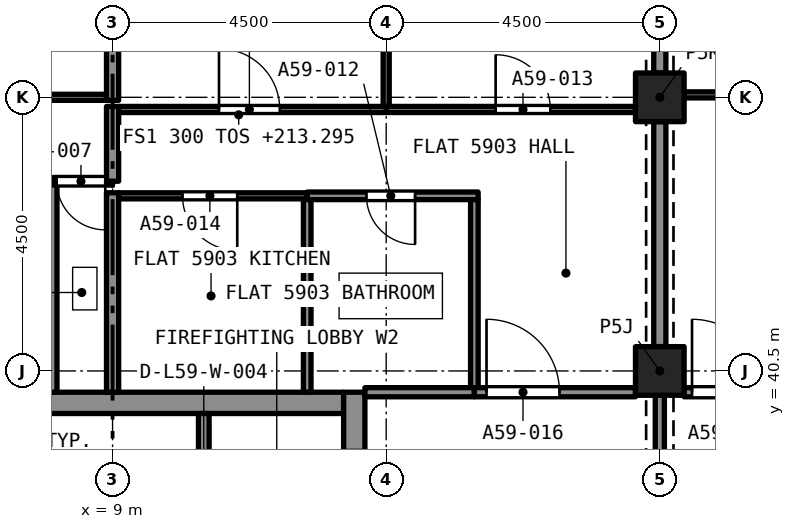
"""IFC4 building model, lengths in metres.
Left out: names, types, materials, properties, quantities, classifications, styles, units other than length and angle.
Written with IfcOpenShell. Run it as: python <this file> out.ifc"""

import sys

from ifc_helpers import new_model, si_unit, direction, frame, frame_2d, origin, origin_2d, place, context, subcontext, project, spatial, rectangle, extrude, element, fill, save


model = new_model("IFC4")
c1 = context("Model", 3, precision=1e-05, world=origin(), true_north=direction((0.0, 1.0)))
c2 = subcontext(c1, "Body", "Model", "MODEL_VIEW")
j1 = project(units=[si_unit("LENGTHUNIT", "METRE"), si_unit("PLANEANGLEUNIT", "RADIAN")], contexts=[c1])
p1 = place(None, origin())
s1 = spatial("IfcSite", under=j1, at=p1, CompositionType="ELEMENT")
p2 = place(p1, origin())
s2 = spatial("IfcBuilding", under=s1, at=p2, CompositionType="ELEMENT")
p3 = place(p2, frame((0.0, 0.0, 213.295)))
s3 = spatial("IfcBuildingStorey", under=s2, at=p3, CompositionType="ELEMENT", Elevation=213.295)
for number, where, z_axis, x_axis in (
    (1, (18.0, 40.5, 0.0), (0.0, 0.0, 1.0), (1.0, 0.0, 0.0)),
    (2, (18.0, 45.0, 0.0), (0.0, 0.0, 1.0), (1.0, 0.0, 0.0)),
):
    element("IfcColumn", number, at=place(p3, frame(where, z_axis=z_axis, x_axis=x_axis)), inside=s3, PredefinedType="COLUMN", context=c2, shape_type="SweptSolid", body=[
        extrude(rectangle(XDim=0.8, YDim=0.8, at=origin_2d()), origin(), (0.0, 0.0, 1.0), 3.2),
    ])
p4 = place(p3, frame((5.2, 39.975, 0.0), z_axis=(0.0, 0.0, 1.0), x_axis=(1.0, 0.0, 0.0)))
e3 = element("IfcWall", 3, at=p4, inside=s3, PredefinedType="SOLIDWALL", context=c2, shape_type="SweptSolid", body=[
    extrude(rectangle(XDim=7.6, YDim=0.35, at=frame_2d((3.8, 0.0))), origin(), (0.0, 0.0, 1.0), 3.2),
])
p5 = place(p3, frame((12.975, 27.35, 0.0), z_axis=(0.0, 0.0, 1.0), x_axis=(0.0, 1.0, 0.0)))
e4 = element("IfcWall", 4, at=p5, inside=s3, PredefinedType="SOLIDWALL", context=c2, shape_type="SweptSolid", body=[
    extrude(rectangle(XDim=12.8, YDim=0.35, at=frame_2d((6.4, 0.0))), origin(), (0.0, 0.0, 1.0), 3.2),
])
p6 = place(p5, frame((10.75, 0.0, 0.0)))
e5 = element("IfcOpeningElement", 5, at=p6, cuts=e4, PredefinedType="OPENING", context=c2, shape_type="SweptSolid", body=[
    extrude(rectangle(XDim=1.1, YDim=2.1, at=frame_2d((0.55, 1.05))), frame((0.0, 0.185, 0.0), z_axis=(0.0, -1.0, 0.0), x_axis=(1.0, 0.0, 0.0)), (0.0, 0.0, 1.0), 0.37),
])
p7 = place(p5, frame((8.6, 0.0, 0.0)))
e6 = element("IfcOpeningElement", 6, at=p7, cuts=e4, PredefinedType="OPENING", context=c2, shape_type="SweptSolid", body=[
    extrude(rectangle(XDim=1.2, YDim=2.1, at=frame_2d((0.6, 1.05))), frame((0.0, 0.185, 0.0), z_axis=(0.0, -1.0, 0.0), x_axis=(1.0, 0.0, 0.0)), (0.0, 0.0, 1.0), 0.37),
])
p8 = place(p3, frame((9.0, 43.62, 0.0), z_axis=(0.0, 0.0, 1.0), x_axis=(-1.0, 0.0, 0.0)))
e7 = element("IfcWall", 7, at=p8, inside=s3, PredefinedType="PARTITIONING", context=c2, shape_type="SweptSolid", body=[
    extrude(rectangle(XDim=0.977, YDim=0.125, at=frame_2d((0.489, 0.0))), origin(), (0.0, 0.0, 1.0), 2.9),
])
p9 = place(p8, frame((0.12, 0.0, 0.0)))
e8 = element("IfcOpeningElement", 8, at=p9, cuts=e7, PredefinedType="OPENING", context=c2, shape_type="SweptSolid", body=[
    extrude(rectangle(XDim=0.8, YDim=2.1, at=frame_2d((0.4, 1.05))), frame((0.0, 0.073, 0.0), z_axis=(0.0, -1.0, 0.0), x_axis=(1.0, 0.0, 0.0)), (0.0, 0.0, 1.0), 0.145),
])
p10 = place(p3, frame((8.023, 40.15, 0.0), z_axis=(0.0, 0.0, 1.0), x_axis=(0.0, 1.0, 0.0)))
e9 = element("IfcWall", 9, at=p10, inside=s3, PredefinedType="PARTITIONING", context=c2, shape_type="SweptSolid", body=[
    extrude(rectangle(XDim=3.408, YDim=0.125, at=frame_2d((1.704, 0.0))), origin(), (0.0, 0.0, 1.0), 2.9),
])
p11 = place(p3, frame((9.0, 40.15, 0.0), z_axis=(0.0, 0.0, 1.0), x_axis=(0.0, 1.0, 0.0)))
e10 = element("IfcWall", 10, at=p11, inside=s3, PredefinedType="PARTITIONING", context=c2, shape_type="SweptSolid", body=[
    extrude(rectangle(XDim=3.28, YDim=0.2, at=frame_2d((1.64, 0.0))), origin(), (0.0, 0.0, 1.0), 2.9),
])
p12 = place(p3, frame((4.5, 45.0, 0.0), z_axis=(0.0, 0.0, 1.0), x_axis=(1.0, 0.0, 0.0)))
e11 = element("IfcWall", 11, at=p12, inside=s3, PredefinedType="PARTITIONING", context=c2, shape_type="SweptSolid", body=[
    extrude(rectangle(XDim=4.4, YDim=0.1, at=frame_2d((2.2, 0.0))), origin(), (0.0, 0.0, 1.0), 2.9),
])
p13 = place(p12, frame((1.8, 0.0, 0.0)))
e12 = element("IfcOpeningElement", 12, at=p13, cuts=e11, PredefinedType="OPENING", context=c2, shape_type="SweptSolid", body=[
    extrude(rectangle(XDim=0.9, YDim=2.1, at=frame_2d((0.45, 1.05))), frame((0.0, 0.06, 0.0), z_axis=(0.0, -1.0, 0.0), x_axis=(1.0, 0.0, 0.0)), (0.0, 0.0, 1.0), 0.12),
])
p14 = place(p3, frame((9.0, 44.95, 0.0), z_axis=(0.0, 0.0, 1.0), x_axis=(0.0, 1.0, 0.0)))
e13 = element("IfcWall", 13, at=p14, inside=s3, PredefinedType="PARTITIONING", context=c2, shape_type="SweptSolid", body=[
    extrude(rectangle(XDim=4.15, YDim=0.2, at=frame_2d((2.075, 0.0))), origin(), (0.0, 0.0, 1.0), 2.9),
])
p15 = place(p3, frame((8.023, 43.62, 0.0), z_axis=(0.0, 0.0, 1.0), x_axis=(-1.0, 0.0, 0.0)))
e14 = element("IfcWall", 14, at=p15, inside=s3, PredefinedType="PARTITIONING", context=c2, shape_type="SweptSolid", body=[
    extrude(rectangle(XDim=1.223, YDim=0.1, at=frame_2d((0.611, 0.0))), origin(), (0.0, 0.0, 1.0), 2.9),
])
p16 = place(p15, frame((0.136, 0.0, 0.0)))
e15 = element("IfcOpeningElement", 15, at=p16, cuts=e14, PredefinedType="OPENING", context=c2, shape_type="SweptSolid", body=[
    extrude(rectangle(XDim=0.9, YDim=2.1, at=frame_2d((0.45, 1.05))), frame((0.0, 0.06, 0.0), z_axis=(0.0, -1.0, 0.0), x_axis=(1.0, 0.0, 0.0)), (0.0, 0.0, 1.0), 0.12),
])
p17 = place(p3, frame((9.0, 43.62, 0.0), z_axis=(0.0, 0.0, 1.0), x_axis=(0.0, 1.0, 0.0)))
e16 = element("IfcWall", 16, at=p17, inside=s3, PredefinedType="PARTITIONING", context=c2, shape_type="SweptSolid", body=[
    extrude(rectangle(XDim=1.23, YDim=0.2, at=frame_2d((0.615, 0.0))), origin(), (0.0, 0.0, 1.0), 2.9),
])
p18 = place(p3, frame((15.012, 43.38, 0.0), z_axis=(0.0, 0.0, 1.0), x_axis=(-1.0, 0.0, 0.0)))
e17 = element("IfcWall", 17, at=p18, inside=s3, PredefinedType="PARTITIONING", context=c2, shape_type="SweptSolid", body=[
    extrude(rectangle(XDim=2.812, YDim=0.125, at=frame_2d((1.406, 0.0))), origin(), (0.0, 0.0, 1.0), 2.9),
])
p19 = place(p18, frame((1.037, 0.0, 0.0)))
e18 = element("IfcOpeningElement", 18, at=p19, cuts=e17, PredefinedType="OPENING", context=c2, shape_type="SweptSolid", body=[
    extrude(rectangle(XDim=0.8, YDim=2.1, at=frame_2d((0.4, 1.05))), frame((0.0, 0.073, 0.0), z_axis=(0.0, -1.0, 0.0), x_axis=(1.0, 0.0, 0.0)), (0.0, 0.0, 1.0), 0.145),
])
p20 = place(p3, frame((14.95, 40.225, 0.0), z_axis=(0.0, 0.0, 1.0), x_axis=(0.0, 1.0, 0.0)))
e19 = element("IfcWall", 19, at=p20, inside=s3, PredefinedType="PARTITIONING", context=c2, shape_type="SweptSolid", body=[
    extrude(rectangle(XDim=3.092, YDim=0.125, at=frame_2d((1.546, 0.0))), origin(), (0.0, 0.0, 1.0), 2.9),
])
p21 = place(p3, frame((12.201, 40.15, 0.0), z_axis=(0.0, 0.0, 1.0), x_axis=(0.0, 1.0, 0.0)))
e20 = element("IfcWall", 20, at=p21, inside=s3, PredefinedType="PARTITIONING", context=c2, shape_type="SweptSolid", body=[
    extrude(rectangle(XDim=3.167, YDim=0.125, at=frame_2d((1.584, 0.0))), origin(), (0.0, 0.0, 1.0), 2.9),
])
p22 = place(p3, frame((13.15, 40.15, 0.0), z_axis=(0.0, 0.0, 1.0), x_axis=(1.0, 0.0, 0.0)))
e21 = element("IfcWall", 21, at=p22, inside=s3, PredefinedType="PARTITIONING", context=c2, shape_type="SweptSolid", body=[
    extrude(rectangle(XDim=1.8, YDim=0.15, at=frame_2d((0.9, 0.0))), origin(), (0.0, 0.0, 1.0), 2.9),
])
p23 = place(p3, frame((13.5, 44.8, 0.0), z_axis=(0.0, 0.0, 1.0), x_axis=(1.0, 0.0, 0.0)))
e22 = element("IfcWall", 22, at=p23, inside=s3, PredefinedType="PARTITIONING", context=c2, shape_type="SweptSolid", body=[
    extrude(rectangle(XDim=4.1, YDim=0.1, at=frame_2d((2.05, 0.0))), origin(), (0.0, 0.0, 1.0), 2.9),
])
p24 = place(p23, frame((1.8, 0.0, 0.0)))
e23 = element("IfcOpeningElement", 23, at=p24, cuts=e22, PredefinedType="OPENING", context=c2, shape_type="SweptSolid", body=[
    extrude(rectangle(XDim=0.9, YDim=2.1, at=frame_2d((0.45, 1.05))), frame((0.0, 0.06, 0.0), z_axis=(0.0, -1.0, 0.0), x_axis=(1.0, 0.0, 0.0)), (0.0, 0.0, 1.0), 0.12),
])
p25 = place(p3, frame((13.5, 44.85, 0.0), z_axis=(0.0, 0.0, 1.0), x_axis=(0.0, 1.0, 0.0)))
e24 = element("IfcWall", 24, at=p25, inside=s3, PredefinedType="PARTITIONING", context=c2, shape_type="SweptSolid", body=[
    extrude(rectangle(XDim=4.25, YDim=0.1, at=frame_2d((2.125, 0.0))), origin(), (0.0, 0.0, 1.0), 2.9),
])
p26 = place(p3, frame((18.0, 45.4, 0.0), z_axis=(0.0, 0.0, 1.0), x_axis=(0.0, 1.0, 0.0)))
e25 = element("IfcWall", 25, at=p26, inside=s3, PredefinedType="PARTITIONING", context=c2, shape_type="SweptSolid", body=[
    extrude(rectangle(XDim=3.7, YDim=0.2, at=frame_2d((1.85, 0.0))), origin(), (0.0, 0.0, 1.0), 2.38),
])
p27 = place(p3, frame((12.201, 43.38, 0.0), z_axis=(0.0, 0.0, 1.0), x_axis=(-1.0, 0.0, 0.0)))
e26 = element("IfcWall", 26, at=p27, inside=s3, PredefinedType="PARTITIONING", context=c2, shape_type="SweptSolid", body=[
    extrude(rectangle(XDim=3.101, YDim=0.1, at=frame_2d((1.55, 0.0))), origin(), (0.0, 0.0, 1.0), 2.9),
])
p28 = place(p27, frame((1.15, 0.0, 0.0)))
e27 = element("IfcOpeningElement", 27, at=p28, cuts=e26, PredefinedType="OPENING", context=c2, shape_type="SweptSolid", body=[
    extrude(rectangle(XDim=0.9, YDim=2.1, at=frame_2d((0.45, 1.05))), frame((0.0, 0.06, 0.0), z_axis=(0.0, -1.0, 0.0), x_axis=(1.0, 0.0, 0.0)), (0.0, 0.0, 1.0), 0.12),
])
p29 = place(p3, frame((9.1, 44.8, 0.0), z_axis=(0.0, 0.0, 1.0), x_axis=(1.0, 0.0, 0.0)))
e28 = element("IfcWall", 28, at=p29, inside=s3, PredefinedType="PARTITIONING", context=c2, shape_type="SweptSolid", body=[
    extrude(rectangle(XDim=4.4, YDim=0.1, at=frame_2d((2.2, 0.0))), origin(), (0.0, 0.0, 1.0), 2.9),
])
p30 = place(p29, frame((1.65, 0.0, 0.0)))
e29 = element("IfcOpeningElement", 29, at=p30, cuts=e28, PredefinedType="OPENING", context=c2, shape_type="SweptSolid", body=[
    extrude(rectangle(XDim=1.0, YDim=2.1, at=frame_2d((0.5, 1.05))), frame((0.0, 0.06, 0.0), z_axis=(0.0, -1.0, 0.0), x_axis=(1.0, 0.0, 0.0)), (0.0, 0.0, 1.0), 0.12),
])
p31 = place(p3, frame((18.0, 40.9, 0.0), z_axis=(0.0, 0.0, 1.0), x_axis=(0.0, 1.0, 0.0)))
e30 = element("IfcWall", 30, at=p31, inside=s3, PredefinedType="PARTITIONING", context=c2, shape_type="SweptSolid", body=[
    extrude(rectangle(XDim=3.7, YDim=0.2, at=frame_2d((1.85, 0.0))), origin(), (0.0, 0.0, 1.0), 2.38),
])
p32 = place(p3, frame((14.95, 40.15, 0.0), z_axis=(0.0, 0.0, 1.0), x_axis=(1.0, 0.0, 0.0)))
e31 = element("IfcWall", 31, at=p32, inside=s3, PredefinedType="PARTITIONING", context=c2, shape_type="SweptSolid", body=[
    extrude(rectangle(XDim=2.65, YDim=0.15, at=frame_2d((1.325, 0.0))), origin(), (0.0, 0.0, 1.0), 2.9),
])
p33 = place(p32, frame((0.2, 0.0, 0.0)))
e32 = element("IfcOpeningElement", 32, at=p33, cuts=e31, PredefinedType="OPENING", context=c2, shape_type="SweptSolid", body=[
    extrude(rectangle(XDim=1.2, YDim=2.4, at=frame_2d((0.6, 1.2))), frame((0.0, 0.085, 0.0), z_axis=(0.0, -1.0, 0.0), x_axis=(1.0, 0.0, 0.0)), (0.0, 0.0, 1.0), 0.17),
])
p34 = place(p3, frame((18.4, 45.04, 0.0), z_axis=(0.0, 0.0, 1.0), x_axis=(1.0, 0.0, 0.0)))
e33 = element("IfcWall", 33, at=p34, inside=s3, PredefinedType="PARTITIONING", context=c2, shape_type="SweptSolid", body=[
    extrude(rectangle(XDim=4.1, YDim=0.1, at=frame_2d((2.05, 0.0))), origin(), (0.0, 0.0, 1.0), 2.75),
])
p35 = place(p34, frame((1.4, 0.0, 0.0)))
e34 = element("IfcOpeningElement", 34, at=p35, cuts=e33, PredefinedType="OPENING", context=c2, shape_type="SweptSolid", body=[
    extrude(rectangle(XDim=0.9, YDim=2.1, at=frame_2d((0.45, 1.05))), frame((0.0, 0.06, 0.0), z_axis=(0.0, -1.0, 0.0), x_axis=(1.0, 0.0, 0.0)), (0.0, 0.0, 1.0), 0.12),
])
p36 = place(p3, frame((18.4, 40.15, 0.0), z_axis=(0.0, 0.0, 1.0), x_axis=(1.0, 0.0, 0.0)))
e35 = element("IfcWall", 35, at=p36, inside=s3, PredefinedType="PARTITIONING", context=c2, shape_type="SweptSolid", body=[
    extrude(rectangle(XDim=1.95, YDim=0.15, at=frame_2d((0.975, 0.0))), origin(), (0.0, 0.0, 1.0), 2.75),
])
p37 = place(p36, frame((0.13, 0.0, 0.0)))
e36 = element("IfcOpeningElement", 36, at=p37, cuts=e35, PredefinedType="OPENING", context=c2, shape_type="SweptSolid", body=[
    extrude(rectangle(XDim=1.2, YDim=2.4, at=frame_2d((0.6, 1.2))), frame((0.0, 0.085, 0.0), z_axis=(0.0, -1.0, 0.0), x_axis=(1.0, 0.0, 0.0)), (0.0, 0.0, 1.0), 0.17),
])
p38 = place(p3, frame((18.0, 40.1, 0.0), z_axis=(0.0, 0.0, 1.0), x_axis=(0.0, -1.0, 0.0)))
e37 = element("IfcWall", 37, at=p38, inside=s3, PredefinedType="PARTITIONING", context=c2, shape_type="SweptSolid", body=[
    extrude(rectangle(XDim=3.7, YDim=0.15, at=frame_2d((1.85, 0.0))), origin(), (0.0, 0.0, 1.0), 2.38),
])
p39 = place(p38, frame((1.25, 0.0, 0.0)))
e38 = element("IfcOpeningElement", 38, at=p39, cuts=e37, PredefinedType="OPENING", context=c2, shape_type="SweptSolid", body=[
    extrude(rectangle(XDim=1.2, YDim=2.1, at=frame_2d((0.6, 1.05))), frame((0.0, 0.085, 0.0), z_axis=(0.0, -1.0, 0.0), x_axis=(1.0, 0.0, 0.0)), (0.0, 0.0, 1.0), 0.17),
])
p40 = place(p3, frame((10.5, 37.5, 0.0), z_axis=(0.0, 0.0, 1.0), x_axis=(0.0, 1.0, 0.0)))
e39 = element("IfcWall", 39, at=p40, inside=s3, PredefinedType="SOLIDWALL", context=c2, shape_type="SweptSolid", body=[
    extrude(rectangle(XDim=2.3, YDim=0.175, at=frame_2d((1.15, 0.0))), origin(), (0.0, 0.0, 1.0), 2.9),
])
p41 = place(p40, frame((0.65, 0.0, 0.0)))
e40 = element("IfcOpeningElement", 40, at=p41, cuts=e39, PredefinedType="OPENING", context=c2, shape_type="SweptSolid", body=[
    extrude(rectangle(XDim=1.0, YDim=2.1, at=frame_2d((0.5, 1.05))), frame((0.0, 0.097, 0.0), z_axis=(0.0, -1.0, 0.0), x_axis=(1.0, 0.0, 0.0)), (0.0, 0.0, 1.0), 0.195),
])
p42 = place(p9, origin())
e41 = element("IfcDoor", 41, at=p42, inside=s3, OperationType="SINGLE_SWING_LEFT", PredefinedType="DOOR", context=c2, shape_type="SweptSolid", body=[
    extrude(rectangle(XDim=0.8, YDim=2.1, at=frame_2d((0.4, 1.05))), frame((0.0, 0.025, 0.0), z_axis=(0.0, -1.0, 0.0), x_axis=(1.0, 0.0, 0.0)), (0.0, 0.0, 1.0), 0.05),
])
fill(e8, e41)
p43 = place(p19, origin())
e42 = element("IfcDoor", 42, at=p43, inside=s3, OperationType="SINGLE_SWING_RIGHT", PredefinedType="DOOR", context=c2, shape_type="SweptSolid", body=[
    extrude(rectangle(XDim=0.8, YDim=2.1, at=frame_2d((0.4, 1.05))), frame((0.0, 0.025, 0.0), z_axis=(0.0, -1.0, 0.0), x_axis=(1.0, 0.0, 0.0)), (0.0, 0.0, 1.0), 0.05),
])
fill(e18, e42)
p44 = place(p24, origin())
e43 = element("IfcDoor", 43, at=p44, inside=s3, OperationType="SINGLE_SWING_RIGHT", PredefinedType="DOOR", context=c2, shape_type="SweptSolid", body=[
    extrude(rectangle(XDim=0.9, YDim=2.1, at=frame_2d((0.45, 1.05))), frame((0.0, 0.025, 0.0), z_axis=(0.0, -1.0, 0.0), x_axis=(1.0, 0.0, 0.0)), (0.0, 0.0, 1.0), 0.05),
])
fill(e23, e43)
p45 = place(p28, origin())
e44 = element("IfcDoor", 44, at=p45, inside=s3, OperationType="SINGLE_SWING_RIGHT", PredefinedType="DOOR", context=c2, shape_type="SweptSolid", body=[
    extrude(rectangle(XDim=0.9, YDim=2.1, at=frame_2d((0.45, 1.05))), frame((0.0, 0.025, 0.0), z_axis=(0.0, -1.0, 0.0), x_axis=(1.0, 0.0, 0.0)), (0.0, 0.0, 1.0), 0.05),
])
fill(e27, e44)
p46 = place(p30, origin())
e45 = element("IfcDoor", 45, at=p46, inside=s3, OperationType="SINGLE_SWING_LEFT", PredefinedType="DOOR", context=c2, shape_type="SweptSolid", body=[
    extrude(rectangle(XDim=1.0, YDim=2.1, at=frame_2d((0.5, 1.05))), frame((0.0, 0.025, 0.0), z_axis=(0.0, -1.0, 0.0), x_axis=(1.0, 0.0, 0.0)), (0.0, 0.0, 1.0), 0.05),
])
fill(e29, e45)
p47 = place(p33, origin())
e46 = element("IfcDoor", 46, at=p47, inside=s3, OperationType="SINGLE_SWING_LEFT", PredefinedType="DOOR", context=c2, shape_type="SweptSolid", body=[
    extrude(rectangle(XDim=1.2, YDim=2.4, at=frame_2d((0.6, 1.2))), frame((0.0, 0.025, 0.0), z_axis=(0.0, -1.0, 0.0), x_axis=(1.0, 0.0, 0.0)), (0.0, 0.0, 1.0), 0.05),
])
fill(e32, e46)
p48 = place(p37, origin())
e47 = element("IfcDoor", 47, at=p48, inside=s3, OperationType="SINGLE_SWING_LEFT", PredefinedType="DOOR", context=c2, shape_type="SweptSolid", body=[
    extrude(rectangle(XDim=1.2, YDim=2.4, at=frame_2d((0.6, 1.2))), frame((0.0, 0.025, 0.0), z_axis=(0.0, -1.0, 0.0), x_axis=(1.0, 0.0, 0.0)), (0.0, 0.0, 1.0), 0.05),
])
fill(e36, e47)
save(model, sys.argv[1])
